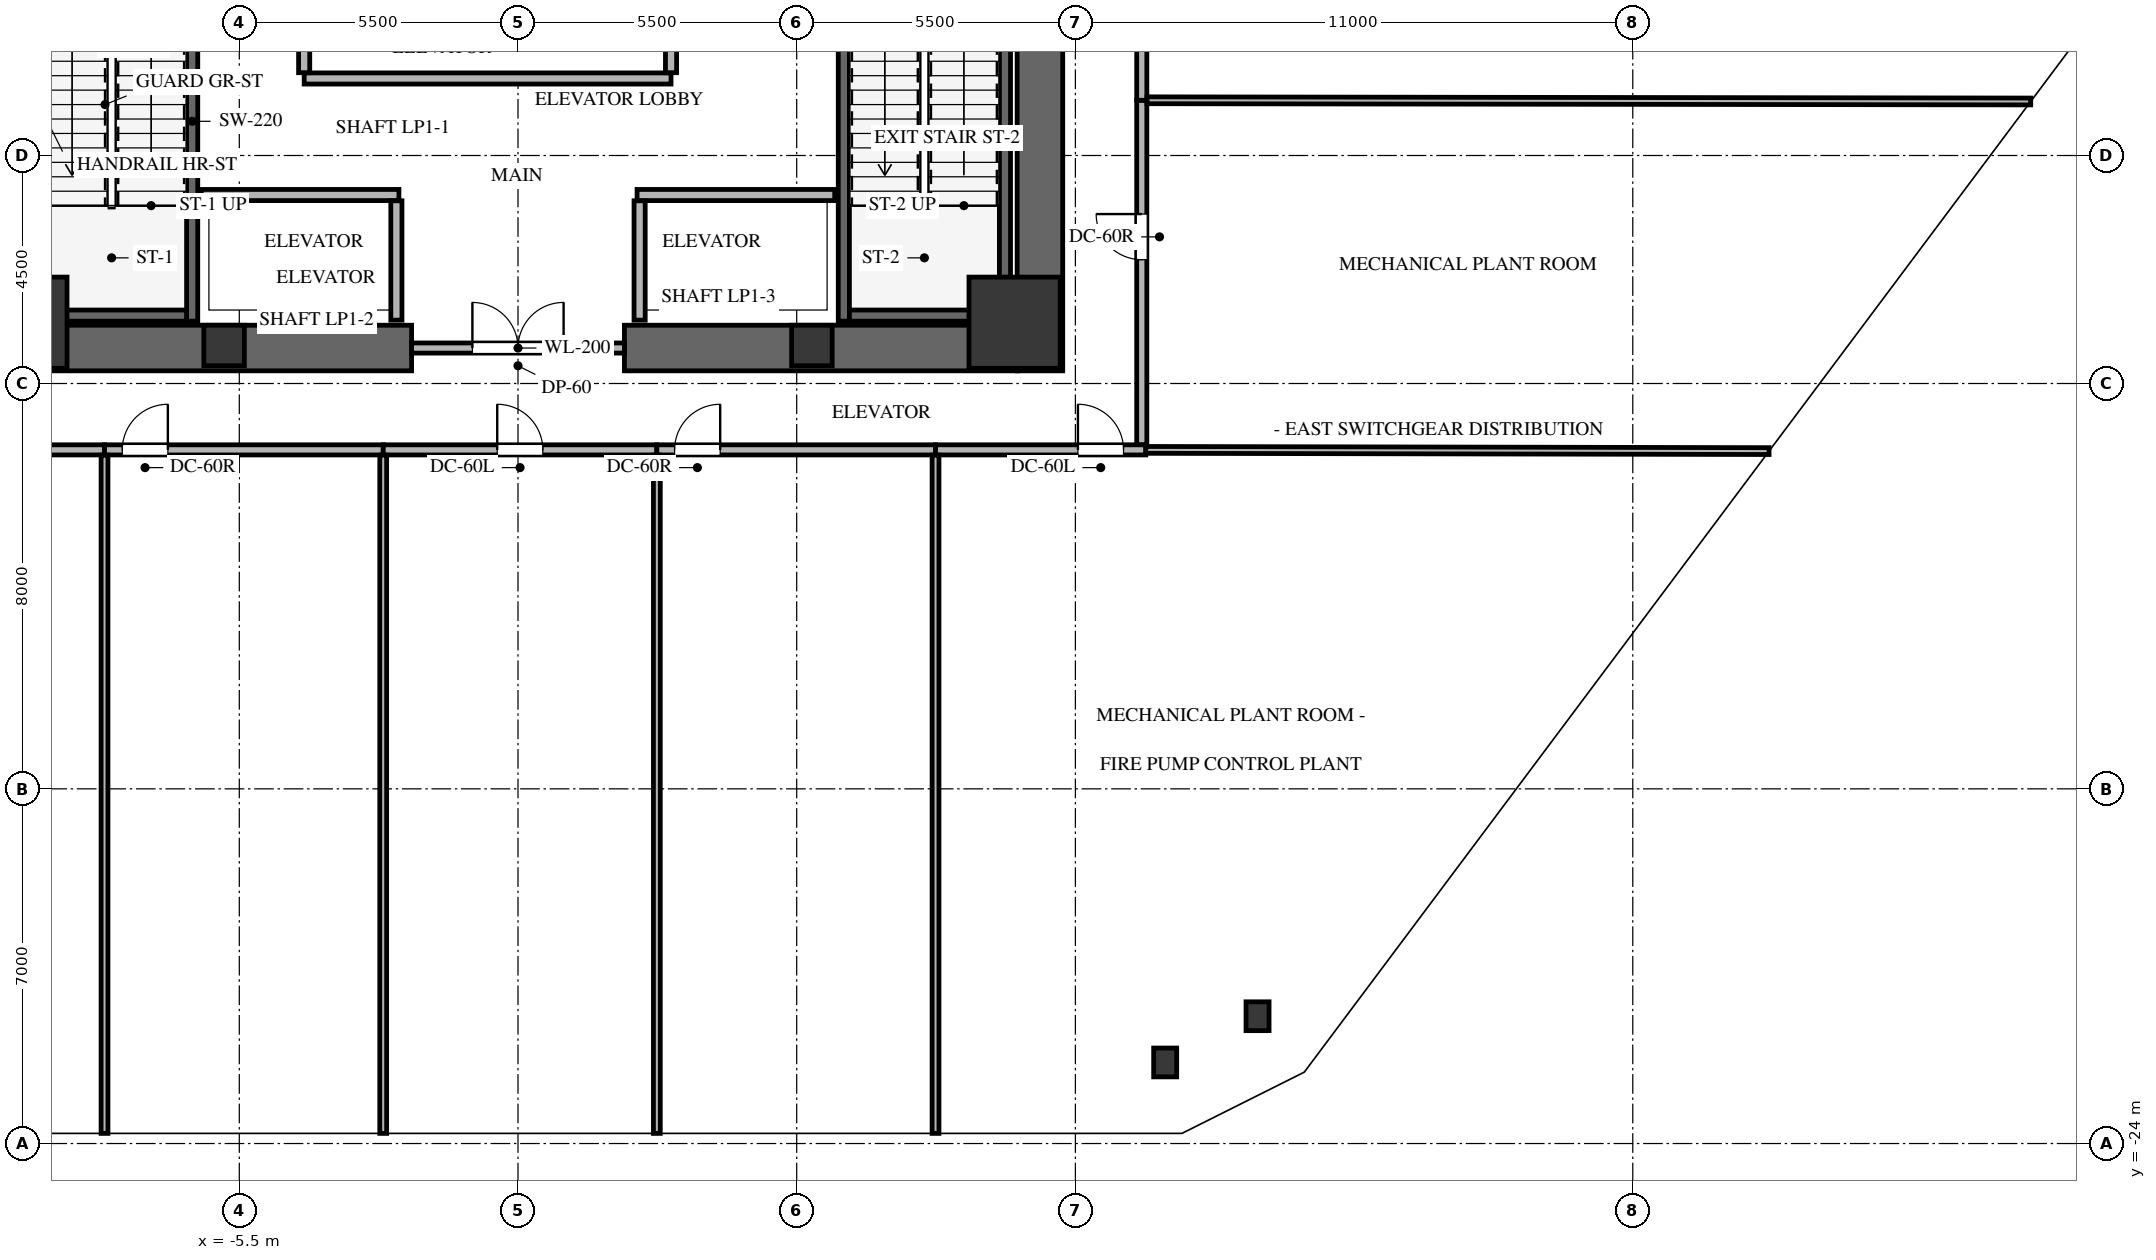
"""IFC4 building model, lengths in metres.
Left out: names, types, materials, properties, quantities, classifications, styles, units other than length and angle.
Written with IfcOpenShell. Run it as: python <this file> out.ifc"""

import sys

from ifc_helpers import new_model, si_unit, direction, frame, frame_2d, origin, origin_2d, place, context, subcontext, project, spatial, rectangle, i_section, extrude, source, transform, mapped, element, fill, save


model = new_model("IFC4")
c1 = context("Model", 3, precision=1e-05, world=origin(), true_north=direction((0.0, 1.0)))
c2 = subcontext(c1, "Body", "Model", "MODEL_VIEW")
j1 = project(units=[si_unit("LENGTHUNIT", "METRE"), si_unit("PLANEANGLEUNIT", "RADIAN")], contexts=[c1])
p1 = place(None, origin())
s1 = spatial("IfcSite", under=j1, at=p1, CompositionType="ELEMENT")
p2 = place(p1, origin())
s2 = spatial("IfcBuilding", under=s1, at=p2, CompositionType="ELEMENT")
p3 = place(p2, frame((0.0, 0.0, 10.4)))
s3 = spatial("IfcBuildingStorey", under=s2, at=p3, CompositionType="ELEMENT", Elevation=10.4)
p4 = place(p3, frame((10.3, -8.75, 0.0), z_axis=(0.0, 0.0, 1.0), x_axis=(0.0, 1.0, 0.0)))
e1 = element("IfcWall", 1, at=p4, inside=s3, PredefinedType="SHEAR", context=c2, shape_type="SweptSolid", body=[
    extrude(rectangle(XDim=17.5, YDim=0.9, at=frame_2d((8.75, 0.0))), origin(), (0.0, 0.0, 1.0), 5.2),
])
for number, where, z_axis, x_axis in (
    (2, (-9.85, -8.3, 0.0), (0.0, 0.0, 1.0), (1.0, 0.0, 0.0)),
    (3, (2.1, -8.3, 0.0), (0.0, 0.0, 1.0), (1.0, 0.0, 0.0)),
):
    element("IfcWall", number, at=place(p3, frame(where, z_axis=z_axis, x_axis=x_axis)), inside=s3, PredefinedType="SHEAR", context=c2, shape_type="SweptSolid", body=[
        extrude(rectangle(XDim=7.75, YDim=0.9, at=frame_2d((3.875, 0.0))), origin(), (0.0, 0.0, 1.0), 5.2),
    ])
p5 = place(p3, frame((-6.43, -7.77, -0.35), z_axis=(0.0, 0.0, 1.0), x_axis=(0.0, 1.0, 0.0)))
e4 = element("IfcWall", 4, at=p5, inside=s3, PredefinedType="SHEAR", context=c2, shape_type="SweptSolid", body=[
    extrude(rectangle(XDim=7.89, YDim=0.22, at=frame_2d((3.945, 0.0))), origin(), (0.0, 0.0, 1.0), 5.23),
])
p6 = place(p5, frame((6.32, 0.0, 0.0)))
e5 = element("IfcOpeningElement", 5, at=p6, cuts=e4, PredefinedType="OPENING", context=c2, shape_type="SweptSolid", body=[
    extrude(rectangle(XDim=1.05, YDim=2.15, at=frame_2d((0.525, 1.075))), frame((0.0, 0.12, 0.0), z_axis=(0.0, -1.0, 0.0), x_axis=(1.0, 0.0, 0.0)), (0.0, 0.0, 1.0), 0.24),
])
p7 = place(p3, frame((-9.5, -7.66, -0.35), z_axis=(0.0, 0.0, 1.0), x_axis=(1.0, 0.0, 0.0)))
e6 = element("IfcWall", 6, at=p7, inside=s3, PredefinedType="SHEAR", context=c2, shape_type="SweptSolid", body=[
    extrude(rectangle(XDim=2.96, YDim=0.22, at=frame_2d((1.48, 0.0))), origin(), (0.0, 0.0, 1.0), 5.23),
])
p8 = place(p3, frame((9.61, -7.77, -0.35), z_axis=(0.0, 0.0, 1.0), x_axis=(0.0, 1.0, 0.0)))
e7 = element("IfcWall", 7, at=p8, inside=s3, PredefinedType="SHEAR", context=c2, shape_type="SweptSolid", body=[
    extrude(rectangle(XDim=7.89, YDim=0.22, at=frame_2d((3.945, 0.0))), origin(), (0.0, 0.0, 1.0), 5.23),
])
p9 = place(p3, frame((6.43, 0.12, -0.35), z_axis=(0.0, 0.0, 1.0), x_axis=(0.0, -1.0, 0.0)))
e8 = element("IfcWall", 8, at=p9, inside=s3, PredefinedType="SHEAR", context=c2, shape_type="SweptSolid", body=[
    extrude(rectangle(XDim=7.89, YDim=0.22, at=frame_2d((3.945, 0.0))), origin(), (0.0, 0.0, 1.0), 5.23),
])
p10 = place(p9, frame((0.52, 0.0, 0.0)))
e9 = element("IfcOpeningElement", 9, at=p10, cuts=e8, PredefinedType="OPENING", context=c2, shape_type="SweptSolid", body=[
    extrude(rectangle(XDim=1.05, YDim=2.15, at=frame_2d((0.525, 1.075))), frame((0.0, 0.12, 0.0), z_axis=(0.0, -1.0, 0.0), x_axis=(1.0, 0.0, 0.0)), (0.0, 0.0, 1.0), 0.24),
])
p11 = place(p3, frame((6.54, -7.66, -0.35), z_axis=(0.0, 0.0, 1.0), x_axis=(1.0, 0.0, 0.0)))
e10 = element("IfcWall", 10, at=p11, inside=s3, PredefinedType="SHEAR", context=c2, shape_type="SweptSolid", body=[
    extrude(rectangle(XDim=2.96, YDim=0.22, at=frame_2d((1.48, 0.0))), origin(), (0.0, 0.0, 1.0), 5.23),
])
m1 = source(origin(), c2, "Body", "SweptSolid", [
    extrude(rectangle(XDim=1.8, YDim=1.8, at=origin_2d()), origin(), (0.0, 0.0, 1.0), 5.23),
])
for number, where, z_axis, x_axis in (
    (11, (-9.8, -7.8, -0.35), (0.0, 0.0, 1.0), (1.0, 0.0, 0.0)),
    (12, (9.8, -7.8, -0.35), (0.0, 0.0, 1.0), (1.0, 0.0, 0.0)),
):
    element("IfcColumn", number, at=place(p3, frame(where, z_axis=z_axis, x_axis=x_axis)), inside=s3, PredefinedType="COLUMN", context=c2, shape_type="MappedRepresentation", body=[
        mapped(m1, transform((0.0, 0.0, 0.0), x_axis=(1.0, 0.0, 0.0), y_axis=(0.0, 1.0, 0.0), z_axis=(0.0, 0.0, 1.0), scale=1.0)),
    ])
m2 = source(origin(), c2, "Body", "SweptSolid", [
    extrude(rectangle(XDim=0.8, YDim=0.8, at=origin_2d()), origin(), (0.0, 0.0, 1.0), 5.23),
])
for number, where, z_axis, x_axis in (
    (13, (-5.8, -8.25, -0.35), (0.0, 0.0, 1.0), (1.0, 0.0, 0.0)),
    (14, (5.8, -8.25, -0.35), (0.0, 0.0, 1.0), (1.0, 0.0, 0.0)),
):
    element("IfcColumn", number, at=place(p3, frame(where, z_axis=z_axis, x_axis=x_axis)), inside=s3, PredefinedType="PILASTER", context=c2, shape_type="MappedRepresentation", body=[
        mapped(m2, transform((0.0, 0.0, 0.0), x_axis=(1.0, 0.0, 0.0), y_axis=(0.0, 1.0, 0.0), z_axis=(0.0, 0.0, 1.0), scale=1.0)),
    ])
m3 = source(origin(), c2, "Body", "SweptSolid", [
    extrude(i_section(OverallWidth=0.454, OverallDepth=0.569, WebThickness=0.078, FlangeThickness=0.125, FilletRadius=0.031, at=origin_2d()), origin(), (0.0, 0.0, 1.0), 5.23),
])
for number, where, z_axis, x_axis in (
    (15, (14.594, -21.488, -0.35), (0.0, 0.0, 1.0), (1.0, 0.0, 0.0)),
    (16, (12.772, -22.4, -0.35), (0.0, 0.0, 1.0), (1.0, 0.0, 0.0)),
):
    element("IfcColumn", number, at=place(p3, frame(where, z_axis=z_axis, x_axis=x_axis)), inside=s3, PredefinedType="COLUMN", context=c2, shape_type="MappedRepresentation", body=[
        mapped(m3, transform((0.0, 0.0, 0.0), x_axis=(1.0, 0.0, 0.0), y_axis=(0.0, 1.0, 0.0), z_axis=(0.0, 0.0, 1.0), scale=1.0)),
    ])
p12 = place(p3, frame((-2.1, -8.3, 0.0), z_axis=(0.0, 0.0, 1.0), x_axis=(1.0, 0.0, 0.0)))
e17 = element("IfcWall", 17, at=p12, inside=s3, PredefinedType="SOLIDWALL", context=c2, shape_type="SweptSolid", body=[
    extrude(rectangle(XDim=4.2, YDim=0.2, at=frame_2d((2.1, 0.0))), origin(), (0.0, 0.0, 1.0), 4.865),
])
p13 = place(p12, frame((1.2, 0.0, 0.0)))
e18 = element("IfcOpeningElement", 18, at=p13, cuts=e17, PredefinedType="OPENING", context=c2, shape_type="SweptSolid", body=[
    extrude(rectangle(XDim=1.8, YDim=2.15, at=frame_2d((0.9, 1.075))), frame((0.0, 0.11, 0.0), z_axis=(0.0, -1.0, 0.0), x_axis=(1.0, 0.0, 0.0)), (0.0, 0.0, 1.0), 0.22),
])
for number, where, z_axis, x_axis in (
    (19, (-6.25, -5.28, 0.0), (0.0, 0.0, 1.0), (1.0, 0.0, 0.0)),
    (20, (2.35, -5.28, 0.0), (0.0, 0.0, 1.0), (1.0, 0.0, 0.0)),
):
    element("IfcWall", number, at=place(p3, frame(where, z_axis=z_axis, x_axis=x_axis)), inside=s3, PredefinedType="SOLIDWALL", context=c2, shape_type="SweptSolid", body=[
        extrude(rectangle(XDim=3.9, YDim=0.22, at=frame_2d((1.95, 0.0))), origin(), (0.0, 0.0, 1.0), 4.865),
    ])
for number, where, z_axis, x_axis in (
    (21, (-2.4, -7.75, 0.0), (0.0, 0.0, 1.0), (0.0, 1.0, 0.0)),
    (22, (2.4, -7.75, 0.0), (0.0, 0.0, 1.0), (0.0, 1.0, 0.0)),
):
    element("IfcWall", number, at=place(p3, frame(where, z_axis=z_axis, x_axis=x_axis)), inside=s3, PredefinedType="SOLIDWALL", context=c2, shape_type="SweptSolid", body=[
        extrude(rectangle(XDim=2.356, YDim=0.22, at=frame_2d((1.178, 0.0))), origin(), (0.0, 0.0, 1.0), 4.865),
    ])
p14 = place(p3, frame((-4.22, -2.98, 0.0), z_axis=(0.0, 0.0, 1.0), x_axis=(1.0, 0.0, 0.0)))
e23 = element("IfcWall", 23, at=p14, inside=s3, PredefinedType="SOLIDWALL", context=c2, shape_type="SweptSolid", body=[
    extrude(rectangle(XDim=7.24, YDim=0.22, at=frame_2d((3.62, 0.0))), origin(), (0.0, 0.0, 1.0), 4.865),
])
for number, where, z_axis, x_axis in (
    (24, (-4.22, -2.866, 0.0), (0.0, 0.0, 1.0), (0.0, 1.0, 0.0)),
    (25, (3.02, -2.866, 0.0), (0.0, 0.0, 1.0), (0.0, 1.0, 0.0)),
):
    element("IfcWall", number, at=place(p3, frame(where, z_axis=z_axis, x_axis=x_axis)), inside=s3, PredefinedType="SOLIDWALL", context=c2, shape_type="SweptSolid", body=[
        extrude(rectangle(XDim=2.132, YDim=0.22, at=frame_2d((1.066, 0.0))), origin(), (0.0, 0.0, 1.0), 4.865),
    ])
p15 = place(p3, frame((-12.39, -10.31, 0.0), z_axis=(0.0, 0.0, 1.0), x_axis=(1.0, 0.0, 0.0)))
e26 = element("IfcWall", 26, at=p15, inside=s3, PredefinedType="SOLIDWALL", context=c2, shape_type="SweptSolid", body=[
    extrude(rectangle(XDim=4.23, YDim=0.2, at=frame_2d((2.115, 0.0))), origin(), (0.0, 0.0, 1.0), 3.787),
])
p16 = place(p15, frame((0.35, 0.0, 0.0)))
e27 = element("IfcOpeningElement", 27, at=p16, cuts=e26, PredefinedType="OPENING", context=c2, shape_type="SweptSolid", body=[
    extrude(rectangle(XDim=0.9, YDim=2.05, at=frame_2d((0.45, 1.025))), frame((0.0, 0.11, 0.0), z_axis=(0.0, -1.0, 0.0), x_axis=(1.0, 0.0, 0.0)), (0.0, 0.0, 1.0), 0.22),
])
p17 = place(p3, frame((-8.16, -10.31, 0.0), z_axis=(0.0, 0.0, 1.0), x_axis=(1.0, 0.0, 0.0)))
e28 = element("IfcWall", 28, at=p17, inside=s3, PredefinedType="SOLIDWALL", context=c2, shape_type="SweptSolid", body=[
    extrude(rectangle(XDim=5.5, YDim=0.2, at=frame_2d((2.75, 0.0))), origin(), (0.0, 0.0, 1.0), 3.787),
])
p18 = place(p17, frame((0.35, 0.0, 0.0)))
e29 = element("IfcOpeningElement", 29, at=p18, cuts=e28, PredefinedType="OPENING", context=c2, shape_type="SweptSolid", body=[
    extrude(rectangle(XDim=0.9, YDim=2.05, at=frame_2d((0.45, 1.025))), frame((0.0, 0.11, 0.0), z_axis=(0.0, -1.0, 0.0), x_axis=(1.0, 0.0, 0.0)), (0.0, 0.0, 1.0), 0.22),
])
p19 = place(p3, frame((-2.66, -10.31, 0.0), z_axis=(0.0, 0.0, 1.0), x_axis=(1.0, 0.0, 0.0)))
e30 = element("IfcWall", 30, at=p19, inside=s3, PredefinedType="SOLIDWALL", context=c2, shape_type="SweptSolid", body=[
    extrude(rectangle(XDim=5.4, YDim=0.2, at=frame_2d((2.7, 0.0))), origin(), (0.0, 0.0, 1.0), 4.418),
])
p20 = place(p19, frame((2.25, 0.0, 0.0)))
e31 = element("IfcOpeningElement", 31, at=p20, cuts=e30, PredefinedType="OPENING", context=c2, shape_type="SweptSolid", body=[
    extrude(rectangle(XDim=0.9, YDim=2.05, at=frame_2d((0.45, 1.025))), frame((0.0, 0.11, 0.0), z_axis=(0.0, -1.0, 0.0), x_axis=(1.0, 0.0, 0.0)), (0.0, 0.0, 1.0), 0.22),
])
p21 = place(p3, frame((2.74, -10.31, 0.0), z_axis=(0.0, 0.0, 1.0), x_axis=(1.0, 0.0, 0.0)))
e32 = element("IfcWall", 32, at=p21, inside=s3, PredefinedType="SOLIDWALL", context=c2, shape_type="SweptSolid", body=[
    extrude(rectangle(XDim=5.5, YDim=0.2, at=frame_2d((2.75, 0.0))), origin(), (0.0, 0.0, 1.0), 3.787),
])
p22 = place(p21, frame((0.35, 0.0, 0.0)))
e33 = element("IfcOpeningElement", 33, at=p22, cuts=e32, PredefinedType="OPENING", context=c2, shape_type="SweptSolid", body=[
    extrude(rectangle(XDim=0.9, YDim=2.05, at=frame_2d((0.45, 1.025))), frame((0.0, 0.11, 0.0), z_axis=(0.0, -1.0, 0.0), x_axis=(1.0, 0.0, 0.0)), (0.0, 0.0, 1.0), 0.22),
])
p23 = place(p3, frame((8.24, -10.31, 0.0), z_axis=(0.0, 0.0, 1.0), x_axis=(1.0, 0.0, 0.0)))
e34 = element("IfcWall", 34, at=p23, inside=s3, PredefinedType="SOLIDWALL", context=c2, shape_type="SweptSolid", body=[
    extrude(rectangle(XDim=4.15, YDim=0.2, at=frame_2d((2.075, 0.0))), origin(), (0.0, 0.0, 1.0), 4.865),
])
p24 = place(p23, frame((2.81, 0.0, 0.0)))
e35 = element("IfcOpeningElement", 35, at=p24, cuts=e34, PredefinedType="OPENING", context=c2, shape_type="SweptSolid", body=[
    extrude(rectangle(XDim=0.9, YDim=2.05, at=frame_2d((0.45, 1.025))), frame((0.0, 0.11, 0.0), z_axis=(0.0, -1.0, 0.0), x_axis=(1.0, 0.0, 0.0)), (0.0, 0.0, 1.0), 0.22),
])
p25 = place(p3, frame((12.31, -10.206, 0.0), z_axis=(0.0, 0.0, 1.0), x_axis=(0.0, 1.0, 0.0)))
e36 = element("IfcWall", 36, at=p25, inside=s3, PredefinedType="SOLIDWALL", context=c2, shape_type="SweptSolid", body=[
    extrude(rectangle(XDim=6.796, YDim=0.2, at=frame_2d((3.398, 0.0))), origin(), (0.0, 0.0, 1.0), 3.787),
])
p26 = place(p25, frame((3.65, 0.0, 0.0)))
e37 = element("IfcOpeningElement", 37, at=p26, cuts=e36, PredefinedType="OPENING", context=c2, shape_type="SweptSolid", body=[
    extrude(rectangle(XDim=0.9, YDim=2.05, at=frame_2d((0.45, 1.025))), frame((0.0, 0.11, 0.0), z_axis=(0.0, -1.0, 0.0), x_axis=(1.0, 0.0, 0.0)), (0.0, 0.0, 1.0), 0.22),
])
p27 = place(p3, frame((12.31, -3.41, 0.0), z_axis=(0.0, 0.0, 1.0), x_axis=(0.0, 1.0, 0.0)))
e38 = element("IfcWall", 38, at=p27, inside=s3, PredefinedType="SOLIDWALL", context=c2, shape_type="SweptSolid", body=[
    extrude(rectangle(XDim=6.9, YDim=0.2, at=frame_2d((3.45, 0.0))), origin(), (0.0, 0.0, 1.0), 3.787),
])
p28 = place(p27, frame((3.0, 0.0, 0.0)))
e39 = element("IfcOpeningElement", 39, at=p28, cuts=e38, PredefinedType="OPENING", context=c2, shape_type="SweptSolid", body=[
    extrude(rectangle(XDim=0.9, YDim=2.05, at=frame_2d((0.45, 1.025))), frame((0.0, 0.11, 0.0), z_axis=(0.0, -1.0, 0.0), x_axis=(1.0, 0.0, 0.0)), (0.0, 0.0, 1.0), 0.22),
])
p29 = place(p3, frame((-8.16, -10.414, 0.0), z_axis=(0.0, 0.0, 1.0), x_axis=(0.0, -1.0, 0.0)))
e40 = element("IfcWall", 40, at=p29, inside=s3, PredefinedType="PARTITIONING", context=c2, shape_type="SweptSolid", body=[
    extrude(rectangle(XDim=13.386, YDim=0.135, at=frame_2d((6.693, 0.0))), origin(), (0.0, 0.0, 1.0), 3.787),
])
for number, where, z_axis, x_axis in (
    (41, (-2.66, -10.414, 0.0), (0.0, 0.0, 1.0), (0.0, -1.0, 0.0)),
    (42, (2.74, -10.414, 0.0), (0.0, 0.0, 1.0), (0.0, -1.0, 0.0)),
):
    element("IfcWall", number, at=place(p3, frame(where, z_axis=z_axis, x_axis=x_axis)), inside=s3, PredefinedType="PARTITIONING", context=c2, shape_type="SweptSolid", body=[
        extrude(rectangle(XDim=13.386, YDim=0.135, at=frame_2d((6.693, 0.0))), origin(), (0.0, 0.0, 1.0), 4.174),
    ])
p30 = place(p3, frame((8.24, -10.414, 0.0), z_axis=(0.0, 0.0, 1.0), x_axis=(0.0, -1.0, 0.0)))
e43 = element("IfcWall", 43, at=p30, inside=s3, PredefinedType="PARTITIONING", context=c2, shape_type="SweptSolid", body=[
    extrude(rectangle(XDim=13.386, YDim=0.135, at=frame_2d((6.693, 0.0))), origin(), (0.0, 0.0, 1.0), 3.787),
])
p31 = place(p3, frame((12.39, -10.31, 0.0), z_axis=(0.0, 0.0, 1.0), x_axis=(0.999998146559, -0.001925325425, 0.0)))
e44 = element("IfcWall", 44, at=p31, inside=s3, PredefinedType="PARTITIONING", context=c2, shape_type="SweptSolid", body=[
    extrude(rectangle(XDim=12.3, YDim=0.135, at=frame_2d((6.15, 0.0))), origin(), (0.0, 0.0, 1.0), 4.174),
])
p32 = place(p3, frame((12.414, -3.41, 0.0), z_axis=(0.0, 0.0, 1.0), x_axis=(0.999999078008, -0.001357933567, 0.0)))
e45 = element("IfcWall", 45, at=p32, inside=s3, PredefinedType="PARTITIONING", context=c2, shape_type="SweptSolid", body=[
    extrude(rectangle(XDim=17.439, YDim=0.135, at=frame_2d((8.72, 0.0))), origin(), (0.0, 0.0, 1.0), 3.787),
])
m4 = source(origin(), c2, "Body", "SweptSolid", [
    extrude(rectangle(XDim=1.8, YDim=2.15, at=frame_2d((0.9, 1.075))), frame((0.0, 0.025, 0.0), z_axis=(0.0, -1.0, 0.0), x_axis=(1.0, 0.0, 0.0)), (0.0, 0.0, 1.0), 0.05),
])
p33 = place(p13, origin())
e46 = element("IfcDoor", 46, at=p33, inside=s3, OperationType="DOUBLE_DOOR_SINGLE_SWING", PredefinedType="DOOR", context=c2, shape_type="MappedRepresentation", body=[
    mapped(m4, transform((0.0, 0.0, 0.0), x_axis=(1.0, 0.0, 0.0), y_axis=(0.0, 1.0, 0.0), z_axis=(0.0, 0.0, 1.0), scale=1.0)),
])
fill(e18, e46)
m5 = source(origin(), c2, "Body", "SweptSolid", [
    extrude(rectangle(XDim=0.9, YDim=2.05, at=frame_2d((0.45, 1.025))), frame((0.0, 0.025, 0.0), z_axis=(0.0, -1.0, 0.0), x_axis=(1.0, 0.0, 0.0)), (0.0, 0.0, 1.0), 0.05),
])
p34 = place(p18, origin())
e47 = element("IfcDoor", 47, at=p34, inside=s3, OperationType="SINGLE_SWING_RIGHT", PredefinedType="DOOR", context=c2, shape_type="MappedRepresentation", body=[
    mapped(m5, transform((0.0, 0.0, 0.0), x_axis=(1.0, 0.0, 0.0), y_axis=(0.0, 1.0, 0.0), z_axis=(0.0, 0.0, 1.0), scale=1.0)),
])
fill(e29, e47)
m6 = source(origin(), c2, "Body", "SweptSolid", [
    extrude(rectangle(XDim=0.9, YDim=2.05, at=frame_2d((0.45, 1.025))), frame((0.0, 0.025, 0.0), z_axis=(0.0, -1.0, 0.0), x_axis=(1.0, 0.0, 0.0)), (0.0, 0.0, 1.0), 0.05),
])
p35 = place(p20, origin())
e48 = element("IfcDoor", 48, at=p35, inside=s3, OperationType="SINGLE_SWING_LEFT", PredefinedType="DOOR", context=c2, shape_type="MappedRepresentation", body=[
    mapped(m6, transform((0.0, 0.0, 0.0), x_axis=(1.0, 0.0, 0.0), y_axis=(0.0, 1.0, 0.0), z_axis=(0.0, 0.0, 1.0), scale=1.0)),
])
fill(e31, e48)
p36 = place(p22, origin())
e49 = element("IfcDoor", 49, at=p36, inside=s3, OperationType="SINGLE_SWING_RIGHT", PredefinedType="DOOR", context=c2, shape_type="MappedRepresentation", body=[
    mapped(m5, transform((0.0, 0.0, 0.0), x_axis=(1.0, 0.0, 0.0), y_axis=(0.0, 1.0, 0.0), z_axis=(0.0, 0.0, 1.0), scale=1.0)),
])
fill(e33, e49)
p37 = place(p24, origin())
e50 = element("IfcDoor", 50, at=p37, inside=s3, OperationType="SINGLE_SWING_LEFT", PredefinedType="DOOR", context=c2, shape_type="MappedRepresentation", body=[
    mapped(m6, transform((0.0, 0.0, 0.0), x_axis=(1.0, 0.0, 0.0), y_axis=(0.0, 1.0, 0.0), z_axis=(0.0, 0.0, 1.0), scale=1.0)),
])
fill(e35, e50)
p38 = place(p26, origin())
e51 = element("IfcDoor", 51, at=p38, inside=s3, OperationType="SINGLE_SWING_RIGHT", PredefinedType="DOOR", context=c2, shape_type="MappedRepresentation", body=[
    mapped(m5, transform((0.0, 0.0, 0.0), x_axis=(1.0, 0.0, 0.0), y_axis=(0.0, 1.0, 0.0), z_axis=(0.0, 0.0, 1.0), scale=1.0)),
])
fill(e37, e51)
save(model, sys.argv[1])
